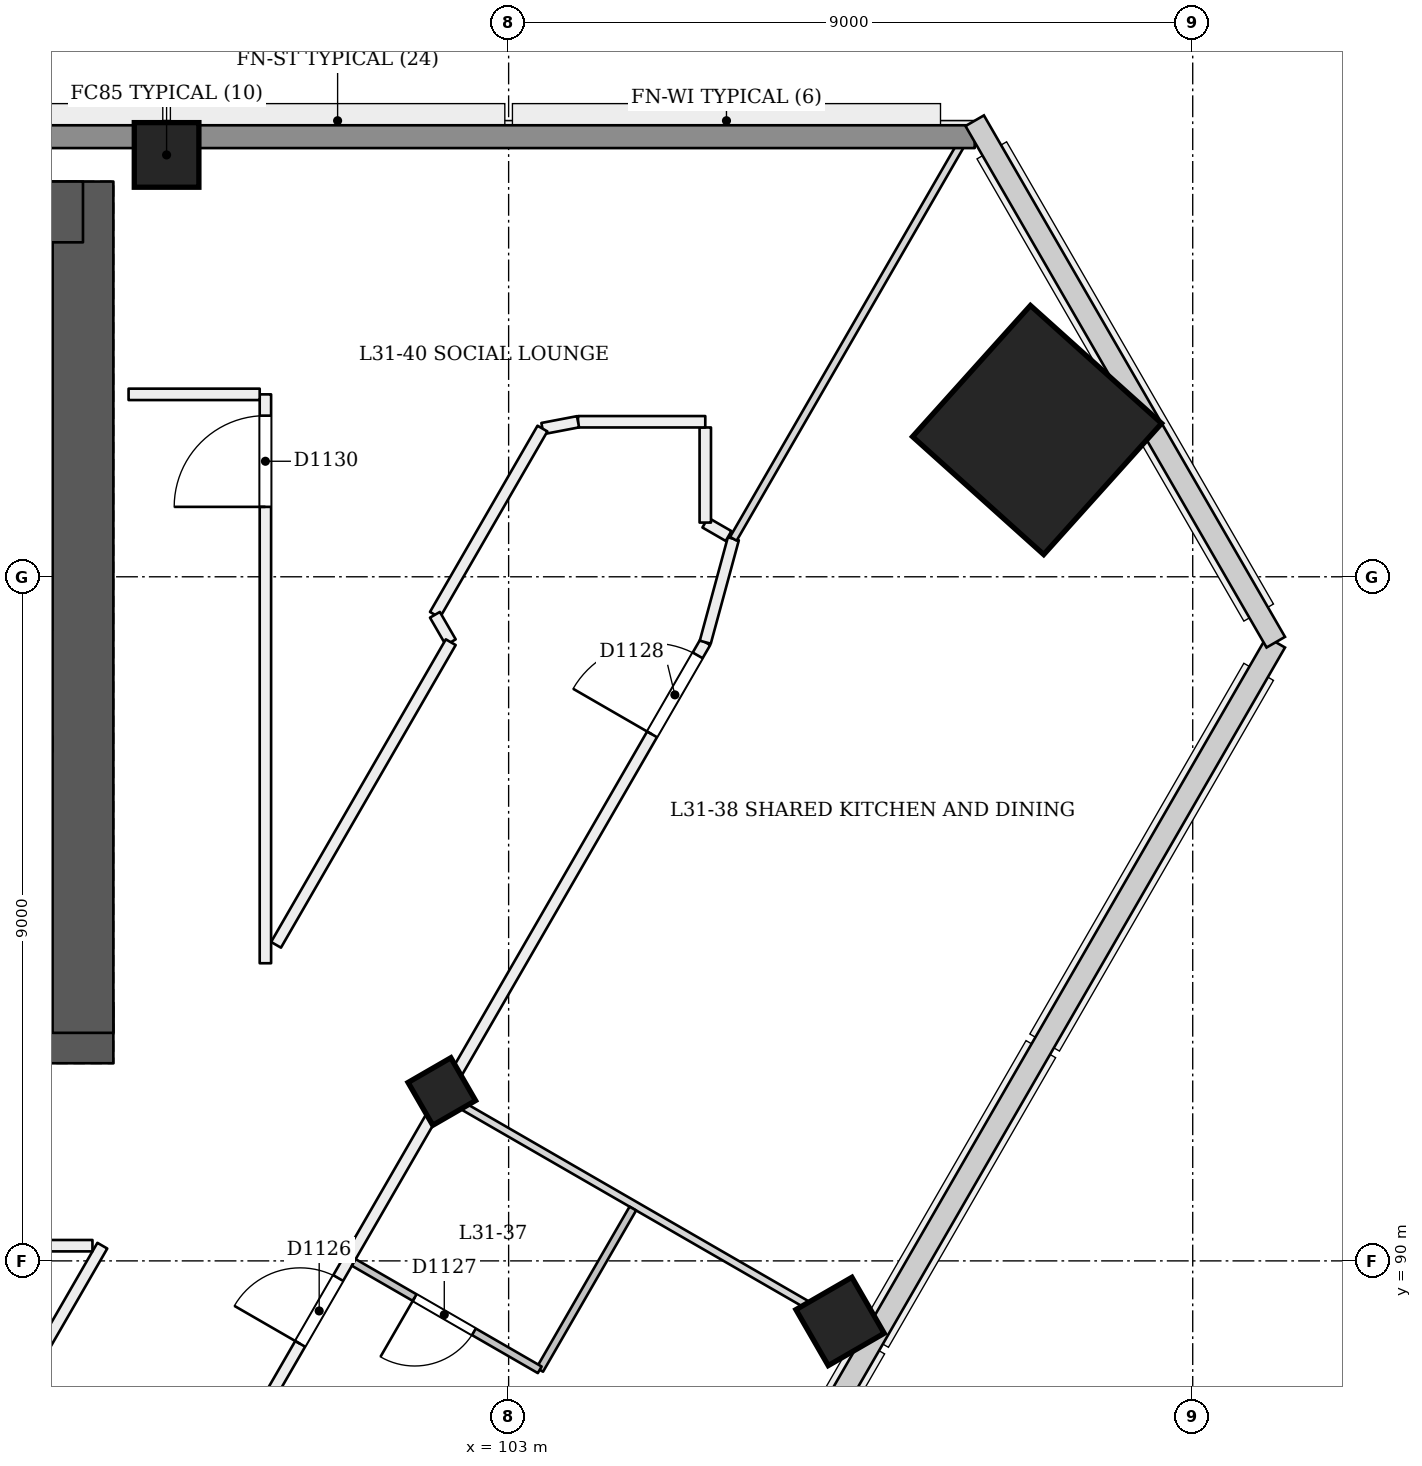
"""IFC4 building model, lengths in metres.
Left out: names, types, materials, properties, quantities, classifications, styles, units other than length and angle.
Written with IfcOpenShell. Run it as: python <this file> out.ifc"""

import sys

from ifc_helpers import new_model, si_unit, direction, frame, frame_2d, origin, origin_2d, place, context, subcontext, project, spatial, rectangle, extrude, element, fill, save


model = new_model("IFC4")
c1 = context("Model", 3, precision=1e-05, world=origin(), true_north=direction((0.0, 1.0)))
c2 = subcontext(c1, "Body", "Model", "MODEL_VIEW")
j1 = project(units=[si_unit("LENGTHUNIT", "METRE"), si_unit("PLANEANGLEUNIT", "RADIAN")], contexts=[c1])
p1 = place(None, origin())
s1 = spatial("IfcSite", under=j1, at=p1, CompositionType="ELEMENT")
p2 = place(p1, origin())
s2 = spatial("IfcBuilding", under=s1, at=p2, CompositionType="ELEMENT")
p3 = place(p2, frame((0.0, 0.0, 124.2)))
s3 = spatial("IfcBuildingStorey", under=s2, at=p3, CompositionType="ELEMENT", Elevation=124.2)
p4 = place(p3, frame((72.6, 93.0, 0.0), z_axis=(0.0, 0.0, 1.0), x_axis=(1.0, 0.0, 0.0)))
e1 = element("IfcWall", 1, at=p4, inside=s3, PredefinedType="SHEAR", context=c2, shape_type="SweptSolid", body=[
    extrude(rectangle(XDim=25.2, YDim=0.8, at=frame_2d((12.6, 0.0))), origin(), (0.0, 0.0, 1.0), 3.6),
])
p5 = place(p4, frame((1.2, 0.0, 0.0)))
e2 = element("IfcOpeningElement", 2, at=p5, cuts=e1, PredefinedType="OPENING", context=c2, shape_type="SweptSolid", body=[
    extrude(rectangle(XDim=1.2, YDim=2.1, at=frame_2d((0.6, 1.05))), frame((0.0, 0.411, 0.0), z_axis=(0.0, -1.0, 0.0), x_axis=(1.0, 0.0, 0.0)), (0.0, 0.0, 1.0), 0.821),
])
p6 = place(p4, frame((3.4, 0.0, 0.0)))
e3 = element("IfcOpeningElement", 3, at=p6, cuts=e1, PredefinedType="OPENING", context=c2, shape_type="SweptSolid", body=[
    extrude(rectangle(XDim=1.2, YDim=2.1, at=frame_2d((0.6, 1.05))), frame((0.0, 0.411, 0.0), z_axis=(0.0, -1.0, 0.0), x_axis=(1.0, 0.0, 0.0)), (0.0, 0.0, 1.0), 0.821),
])
p7 = place(p4, frame((13.4, 0.0, 0.0)))
e4 = element("IfcOpeningElement", 4, at=p7, cuts=e1, PredefinedType="OPENING", context=c2, shape_type="SweptSolid", body=[
    extrude(rectangle(XDim=1.2, YDim=2.1, at=frame_2d((0.6, 1.05))), frame((0.0, 0.411, 0.0), z_axis=(0.0, -1.0, 0.0), x_axis=(1.0, 0.0, 0.0)), (0.0, 0.0, 1.0), 0.821),
])
p8 = place(p4, frame((16.113, 0.0, 0.0)))
e5 = element("IfcOpeningElement", 5, at=p8, cuts=e1, PredefinedType="OPENING", context=c2, shape_type="SweptSolid", body=[
    extrude(rectangle(XDim=1.0, YDim=2.1, at=frame_2d((0.5, 1.05))), frame((0.0, 0.411, 0.0), z_axis=(0.0, -1.0, 0.0), x_axis=(1.0, 0.0, 0.0)), (0.0, 0.0, 1.0), 0.821),
])
p9 = place(p4, frame((20.0, 0.0, 0.0)))
e6 = element("IfcOpeningElement", 6, at=p9, cuts=e1, PredefinedType="OPENING", context=c2, shape_type="SweptSolid", body=[
    extrude(rectangle(XDim=1.0, YDim=2.1, at=frame_2d((0.5, 1.05))), frame((0.0, 0.411, 0.0), z_axis=(0.0, -1.0, 0.0), x_axis=(1.0, 0.0, 0.0)), (0.0, 0.0, 1.0), 0.821),
])
p10 = place(p4, frame((23.137, 0.0, 0.0)))
e7 = element("IfcOpeningElement", 7, at=p10, cuts=e1, PredefinedType="OPENING", context=c2, shape_type="SweptSolid", body=[
    extrude(rectangle(XDim=1.0, YDim=2.1, at=frame_2d((0.5, 1.05))), frame((0.0, 0.411, 0.0), z_axis=(0.0, -1.0, 0.0), x_axis=(1.0, 0.0, 0.0)), (0.0, 0.0, 1.0), 0.821),
])
p11 = place(p3, frame((97.4, 93.0, 0.0), z_axis=(0.0, 0.0, 1.0), x_axis=(0.0, 1.0, 0.0)))
e8 = element("IfcWall", 8, at=p11, inside=s3, PredefinedType="SHEAR", context=c2, shape_type="SweptSolid", body=[
    extrude(rectangle(XDim=11.2, YDim=0.8, at=frame_2d((5.6, 0.0))), origin(), (0.0, 0.0, 1.0), 3.6),
])
p12 = place(p3, frame((97.4, 103.8, 0.0), z_axis=(0.0, 0.0, 1.0), x_axis=(-1.0, 0.0, 0.0)))
e9 = element("IfcWall", 9, at=p12, inside=s3, PredefinedType="SHEAR", context=c2, shape_type="SweptSolid", body=[
    extrude(rectangle(XDim=25.2, YDim=0.8, at=frame_2d((12.6, 0.0))), origin(), (0.0, 0.0, 1.0), 3.6),
])
p13 = place(p3, frame((102.148, 92.181, -0.02), z_axis=(-0.022221406801, 0.038413224561, 0.999014831351), x_axis=(-0.499512940858, -0.866022219206, 0.022188685317)))
e10 = element("IfcColumn", 10, at=p13, inside=s3, PredefinedType="COLUMN", context=c2, shape_type="SweptSolid", body=[
    extrude(rectangle(XDim=0.65, YDim=0.65, at=origin_2d()), origin(), (0.0, 0.0, 1.0), 3.604),
])
p14 = place(p3, frame((109.986, 100.92, 0.0), z_axis=(-0.028334066552, 0.009286524205, 0.999555371723), x_axis=(0.498277960515, -0.866733668872, 0.022177044631)))
e11 = element("IfcColumn", 11, at=p14, inside=s3, PredefinedType="COLUMN", context=c2, shape_type="SweptSolid", body=[
    extrude(rectangle(XDim=2.32, YDim=2.32, at=origin_2d()), origin(), (0.0, 0.0, 1.0), 3.602),
])
p15 = place(p3, frame((98.5, 104.55, 0.0), z_axis=(0.0, 0.0, 1.0), x_axis=(1.0, 0.0, 0.0)))
e12 = element("IfcColumn", 12, at=p15, inside=s3, PredefinedType="COLUMN", context=c2, shape_type="SweptSolid", body=[
    extrude(rectangle(XDim=0.85, YDim=0.85, at=origin_2d()), origin(), (0.0, 0.0, 1.0), 3.6),
])
p16 = place(p3, frame((107.388, 89.156, -0.026), z_axis=(-0.022222852987, 0.038483477124, 0.999012095419), x_axis=(-0.500174626395, -0.865639439229, 0.022219459073)))
e13 = element("IfcColumn", 13, at=p16, inside=s3, PredefinedType="COLUMN", context=c2, shape_type="SweptSolid", body=[
    extrude(rectangle(XDim=0.85, YDim=0.85, at=origin_2d()), origin(), (0.0, 0.0, 1.0), 3.604),
])
p17 = place(p3, frame((97.655, 90.2, 0.0), z_axis=(0.0, 0.0, 1.0), x_axis=(-0.5000058613, -0.866022019735, 0.0)))
e14 = element("IfcWall", 14, at=p17, inside=s3, PredefinedType="PARTITIONING", context=c2, shape_type="SweptSolid", body=[
    extrude(rectangle(XDim=25.179, YDim=0.15, at=frame_2d((12.59, 0.0))), origin(), (0.0, 0.0, 1.0), 3.15),
])
p18 = place(p17, frame((11.939, 0.0, 0.0)))
e15 = element("IfcOpeningElement", 15, at=p18, cuts=e14, PredefinedType="OPENING", context=c2, shape_type="SweptSolid", body=[
    extrude(rectangle(XDim=1.0, YDim=2.1, at=frame_2d((0.5, 1.05))), frame((0.0, 0.085, 0.0), z_axis=(0.0, -1.0, 0.0), x_axis=(1.0, 0.0, 0.0)), (0.0, 0.0, 1.0), 0.171),
])
p19 = place(p17, frame((7.517, 0.0, 0.0)))
e16 = element("IfcOpeningElement", 16, at=p19, cuts=e14, PredefinedType="OPENING", context=c2, shape_type="SweptSolid", body=[
    extrude(rectangle(XDim=1.0, YDim=2.1, at=frame_2d((0.5, 1.05))), frame((0.0, 0.085, 0.0), z_axis=(0.0, -1.0, 0.0), x_axis=(1.0, 0.0, 0.0)), (0.0, 0.0, 1.0), 0.171),
])
p20 = place(p17, frame((3.271, 0.0, 0.0)))
e17 = element("IfcOpeningElement", 17, at=p20, cuts=e14, PredefinedType="OPENING", context=c2, shape_type="SweptSolid", body=[
    extrude(rectangle(XDim=1.0, YDim=2.1, at=frame_2d((0.5, 1.05))), frame((0.0, 0.085, 0.0), z_axis=(0.0, -1.0, 0.0), x_axis=(1.0, 0.0, 0.0)), (0.0, 0.0, 1.0), 0.171),
])
p21 = place(p17, frame((14.95, 0.0, 0.0)))
e18 = element("IfcOpeningElement", 18, at=p21, cuts=e14, PredefinedType="OPENING", context=c2, shape_type="SweptSolid", body=[
    extrude(rectangle(XDim=1.0, YDim=2.1, at=frame_2d((0.5, 1.05))), frame((0.0, 0.085, 0.0), z_axis=(0.0, -1.0, 0.0), x_axis=(1.0, 0.0, 0.0)), (0.0, 0.0, 1.0), 0.171),
])
p22 = place(p17, frame((18.033, 0.0, 0.0)))
e19 = element("IfcOpeningElement", 19, at=p22, cuts=e14, PredefinedType="OPENING", context=c2, shape_type="SweptSolid", body=[
    extrude(rectangle(XDim=1.0, YDim=2.1, at=frame_2d((0.5, 1.05))), frame((0.0, 0.085, 0.0), z_axis=(0.0, -1.0, 0.0), x_axis=(1.0, 0.0, 0.0)), (0.0, 0.0, 1.0), 0.171),
])
p23 = place(p3, frame((85.208, 62.842, 0.0), z_axis=(0.0, 0.0, 1.0), x_axis=(0.499999338616, 0.866025785634, 0.0)))
e20 = element("IfcWall", 20, at=p23, inside=s3, PredefinedType="PARTITIONING", context=c2, shape_type="SweptSolid", body=[
    extrude(rectangle(XDim=40.758, YDim=0.15, at=frame_2d((20.379, 0.0))), origin(), (0.0, 0.0, 1.0), 2.75),
])
p24 = place(p23, frame((0.295, 0.0, 0.0)))
e21 = element("IfcOpeningElement", 21, at=p24, cuts=e20, PredefinedType="OPENING", context=c2, shape_type="SweptSolid", body=[
    extrude(rectangle(XDim=1.2, YDim=2.1, at=frame_2d((0.6, 1.05))), frame((0.0, 0.085, 0.0), z_axis=(0.0, -1.0, 0.0), x_axis=(1.0, 0.0, 0.0)), (0.0, 0.0, 1.0), 0.171),
])
p25 = place(p23, frame((4.129, 0.0, 0.0)))
e22 = element("IfcOpeningElement", 22, at=p25, cuts=e20, PredefinedType="OPENING", context=c2, shape_type="SweptSolid", body=[
    extrude(rectangle(XDim=1.0, YDim=2.1, at=frame_2d((0.5, 1.05))), frame((0.0, 0.085, 0.0), z_axis=(0.0, -1.0, 0.0), x_axis=(1.0, 0.0, 0.0)), (0.0, 0.0, 1.0), 0.171),
])
p26 = place(p23, frame((9.659, 0.0, 0.0)))
e23 = element("IfcOpeningElement", 23, at=p26, cuts=e20, PredefinedType="OPENING", context=c2, shape_type="SweptSolid", body=[
    extrude(rectangle(XDim=1.0, YDim=2.1, at=frame_2d((0.5, 1.05))), frame((0.0, 0.085, 0.0), z_axis=(0.0, -1.0, 0.0), x_axis=(1.0, 0.0, 0.0)), (0.0, 0.0, 1.0), 0.171),
])
p27 = place(p23, frame((11.984, 0.0, 0.0)))
e24 = element("IfcOpeningElement", 24, at=p27, cuts=e20, PredefinedType="OPENING", context=c2, shape_type="SweptSolid", body=[
    extrude(rectangle(XDim=1.0, YDim=2.1, at=frame_2d((0.5, 1.05))), frame((0.0, 0.085, 0.0), z_axis=(0.0, -1.0, 0.0), x_axis=(1.0, 0.0, 0.0)), (0.0, 0.0, 1.0), 0.171),
])
p28 = place(p23, frame((18.774, 0.0, 0.0)))
e25 = element("IfcOpeningElement", 25, at=p28, cuts=e20, PredefinedType="OPENING", context=c2, shape_type="SweptSolid", body=[
    extrude(rectangle(XDim=1.0, YDim=2.1, at=frame_2d((0.5, 1.05))), frame((0.0, 0.085, 0.0), z_axis=(0.0, -1.0, 0.0), x_axis=(1.0, 0.0, 0.0)), (0.0, 0.0, 1.0), 0.171),
])
p29 = place(p23, frame((21.099, 0.0, 0.0)))
e26 = element("IfcOpeningElement", 26, at=p29, cuts=e20, PredefinedType="OPENING", context=c2, shape_type="SweptSolid", body=[
    extrude(rectangle(XDim=1.0, YDim=2.1, at=frame_2d((0.5, 1.05))), frame((0.0, 0.085, 0.0), z_axis=(0.0, -1.0, 0.0), x_axis=(1.0, 0.0, 0.0)), (0.0, 0.0, 1.0), 0.171),
])
p30 = place(p23, frame((27.659, 0.0, 0.0)))
e27 = element("IfcOpeningElement", 27, at=p30, cuts=e20, PredefinedType="OPENING", context=c2, shape_type="SweptSolid", body=[
    extrude(rectangle(XDim=1.0, YDim=2.1, at=frame_2d((0.5, 1.05))), frame((0.0, 0.085, 0.0), z_axis=(0.0, -1.0, 0.0), x_axis=(1.0, 0.0, 0.0)), (0.0, 0.0, 1.0), 0.171),
])
p31 = place(p23, frame((30.099, 0.0, 0.0)))
e28 = element("IfcOpeningElement", 28, at=p31, cuts=e20, PredefinedType="OPENING", context=c2, shape_type="SweptSolid", body=[
    extrude(rectangle(XDim=1.0, YDim=2.1, at=frame_2d((0.5, 1.05))), frame((0.0, 0.085, 0.0), z_axis=(0.0, -1.0, 0.0), x_axis=(1.0, 0.0, 0.0)), (0.0, 0.0, 1.0), 0.171),
])
p32 = place(p23, frame((39.358, 0.0, 0.0)))
e29 = element("IfcOpeningElement", 29, at=p32, cuts=e20, PredefinedType="OPENING", context=c2, shape_type="SweptSolid", body=[
    extrude(rectangle(XDim=1.2, YDim=2.1, at=frame_2d((0.6, 1.05))), frame((0.0, 0.085, 0.0), z_axis=(0.0, -1.0, 0.0), x_axis=(1.0, 0.0, 0.0)), (0.0, 0.0, 1.0), 0.171),
])
p33 = place(p3, frame((105.587, 98.139, 0.0), z_axis=(0.0, 0.0, 1.0), x_axis=(0.261842333215, 0.965110663363, 0.0)))
e30 = element("IfcWall", 30, at=p33, inside=s3, PredefinedType="PARTITIONING", context=c2, shape_type="SweptSolid", body=[
    extrude(rectangle(XDim=1.41, YDim=0.15, at=frame_2d((0.705, 0.0))), origin(), (0.0, 0.0, 1.0), 3.15),
])
p34 = place(p3, frame((105.894, 99.536, 0.0), z_axis=(0.0, 0.0, 1.0), x_axis=(-0.865898279276, 0.500220121494, 0.0)))
e31 = element("IfcWall", 31, at=p34, inside=s3, PredefinedType="PARTITIONING", context=c2, shape_type="SweptSolid", body=[
    extrude(rectangle(XDim=0.354, YDim=0.15, at=frame_2d((0.177, 0.0))), origin(), (0.0, 0.0, 1.0), 3.15),
])
p35 = place(p3, frame((105.587, 99.713, 0.0), z_axis=(0.0, 0.0, 1.0), x_axis=(0.0, 1.0, 0.0)))
e32 = element("IfcWall", 32, at=p35, inside=s3, PredefinedType="PARTITIONING", context=c2, shape_type="SweptSolid", body=[
    extrude(rectangle(XDim=1.251, YDim=0.15, at=frame_2d((0.626, 0.0))), origin(), (0.0, 0.0, 1.0), 3.15),
])
p36 = place(p3, frame((105.587, 101.04, 0.0), z_axis=(0.0, 0.0, 1.0), x_axis=(-1.0, 0.0, 0.0)))
e33 = element("IfcWall", 33, at=p36, inside=s3, PredefinedType="PARTITIONING", context=c2, shape_type="SweptSolid", body=[
    extrude(rectangle(XDim=1.674, YDim=0.15, at=frame_2d((0.837, 0.0))), origin(), (0.0, 0.0, 1.0), 3.15),
])
p37 = place(p3, frame((103.913, 101.04, 0.0), z_axis=(0.0, 0.0, 1.0), x_axis=(-0.982163245306, -0.188030209195, 0.0)))
e34 = element("IfcWall", 34, at=p37, inside=s3, PredefinedType="PARTITIONING", context=c2, shape_type="SweptSolid", body=[
    extrude(rectangle(XDim=0.477, YDim=0.15, at=frame_2d((0.238, 0.0))), origin(), (0.0, 0.0, 1.0), 3.15),
])
p38 = place(p3, frame((103.445, 100.95, 0.0), z_axis=(0.0, 0.0, 1.0), x_axis=(-0.499954046029, -0.866051933696, 0.0)))
e35 = element("IfcWall", 35, at=p38, inside=s3, PredefinedType="PARTITIONING", context=c2, shape_type="SweptSolid", body=[
    extrude(rectangle(XDim=2.829, YDim=0.15, at=frame_2d((1.415, 0.0))), origin(), (0.0, 0.0, 1.0), 3.15),
])
p39 = place(p3, frame((102.031, 98.5, 0.0), z_axis=(0.0, 0.0, 1.0), x_axis=(0.49967168172, -0.866214875471, 0.0)))
e36 = element("IfcWall", 36, at=p39, inside=s3, PredefinedType="PARTITIONING", context=c2, shape_type="SweptSolid", body=[
    extrude(rectangle(XDim=0.416, YDim=0.15, at=frame_2d((0.208, 0.0))), origin(), (0.0, 0.0, 1.0), 3.15),
])
p40 = place(p3, frame((102.239, 98.139, 0.0), z_axis=(0.0, 0.0, 1.0), x_axis=(-0.500005941123, -0.866021973648, 0.0)))
e37 = element("IfcWall", 37, at=p40, inside=s3, PredefinedType="PARTITIONING", context=c2, shape_type="SweptSolid", body=[
    extrude(rectangle(XDim=4.597, YDim=0.15, at=frame_2d((2.299, 0.0))), origin(), (0.0, 0.0, 1.0), 3.15),
])
p41 = place(p3, frame((99.8, 93.916, 0.0), z_axis=(0.0, 0.0, 1.0), x_axis=(0.0, 1.0, 0.0)))
e38 = element("IfcWall", 38, at=p41, inside=s3, PredefinedType="PARTITIONING", context=c2, shape_type="SweptSolid", body=[
    extrude(rectangle(XDim=7.484, YDim=0.15, at=frame_2d((3.742, 0.0))), origin(), (0.0, 0.0, 1.0), 3.15),
])
p42 = place(p41, frame((6.004, 0.0, 0.0)))
e39 = element("IfcOpeningElement", 39, at=p42, cuts=e38, PredefinedType="OPENING", context=c2, shape_type="SweptSolid", body=[
    extrude(rectangle(XDim=1.2, YDim=2.1, at=frame_2d((0.6, 1.05))), frame((0.0, 0.085, 0.0), z_axis=(0.0, -1.0, 0.0), x_axis=(1.0, 0.0, 0.0)), (0.0, 0.0, 1.0), 0.171),
])
p43 = place(p3, frame((99.725, 101.4, 0.0), z_axis=(0.0, 0.0, 1.0), x_axis=(-1.0, 0.0, 0.0)))
e40 = element("IfcWall", 40, at=p43, inside=s3, PredefinedType="PARTITIONING", context=c2, shape_type="SweptSolid", body=[
    extrude(rectangle(XDim=1.725, YDim=0.15, at=frame_2d((0.863, 0.0))), origin(), (0.0, 0.0, 1.0), 3.15),
])
p44 = place(p3, frame((88.0, 90.2, 0.0), z_axis=(0.0, 0.0, 1.0), x_axis=(1.0, 0.0, 0.0)))
e41 = element("IfcWall", 41, at=p44, inside=s3, PredefinedType="PARTITIONING", context=c2, shape_type="SweptSolid", body=[
    extrude(rectangle(XDim=9.525, YDim=0.15, at=frame_2d((4.762, 0.0))), origin(), (0.0, 0.0, 1.0), 3.15),
])
p45 = place(p3, frame((104.634, 90.689, 0.0), z_axis=(0.0, 0.0, 1.0), x_axis=(-0.499987006516, -0.866032905446, 0.0)))
e42 = element("IfcWall", 42, at=p45, inside=s3, PredefinedType="PARTITIONING", context=c2, shape_type="SweptSolid", body=[
    extrude(rectangle(XDim=2.45, YDim=0.1, at=frame_2d((1.225, 0.0))), origin(), (0.0, 0.0, 1.0), 2.75),
])
p46 = place(p3, frame((103.409, 88.567, 0.0), z_axis=(0.0, 0.0, 1.0), x_axis=(-0.866048868473, 0.499959355765, 0.0)))
e43 = element("IfcWall", 43, at=p46, inside=s3, PredefinedType="PARTITIONING", context=c2, shape_type="SweptSolid", body=[
    extrude(rectangle(XDim=2.825, YDim=0.1, at=frame_2d((1.413, 0.0))), origin(), (0.0, 0.0, 1.0), 3.15),
])
p47 = place(p46, frame((1.0, 0.0, 0.0)))
e44 = element("IfcOpeningElement", 44, at=p47, cuts=e43, PredefinedType="OPENING", context=c2, shape_type="SweptSolid", body=[
    extrude(rectangle(XDim=0.9, YDim=2.1, at=frame_2d((0.45, 1.05))), frame((0.0, 0.061, 0.0), z_axis=(0.0, -1.0, 0.0), x_axis=(1.0, 0.0, 0.0)), (0.0, 0.0, 1.0), 0.121),
])
p48 = place(p3, frame((107.69, 88.982, 0.0), z_axis=(0.0, 0.0, 1.0), x_axis=(-0.866032601554, 0.49998753289, 0.0)))
e45 = element("IfcWall", 45, at=p48, inside=s3, PredefinedType="PARTITIONING", context=c2, shape_type="SweptSolid", body=[
    extrude(rectangle(XDim=6.325, YDim=0.1, at=frame_2d((3.163, 0.0))), origin(), (0.0, 0.0, 1.0), 2.65),
])
p49 = place(p3, frame((109.074, 104.9, 0.0), z_axis=(0.0, 0.0, 1.0), x_axis=(-0.500004896655, -0.866022576681, 0.0)))
e46 = element("IfcWall", 46, at=p49, inside=s3, PredefinedType="PARTITIONING", context=c2, shape_type="SweptSolid", body=[
    extrude(rectangle(XDim=6.235, YDim=0.1, at=frame_2d((3.118, 0.0))), origin(), (0.0, 0.0, 1.0), 2.65),
])
p50 = place(p3, frame((60.868, 104.79, 0.0), z_axis=(0.0, 0.0, 1.0), x_axis=(1.0, 0.0, 0.0)))
e47 = element("IfcWall", 47, at=p50, inside=s3, PredefinedType="SOLIDWALL", context=c2, shape_type="SweptSolid", body=[
    extrude(rectangle(XDim=48.264, YDim=0.3, at=frame_2d((24.132, 0.0))), origin(), (0.0, 0.0, 1.0), 2.65),
])
p51 = place(p31, origin())
e48 = element("IfcDoor", 48, at=p51, inside=s3, OperationType="SINGLE_SWING_LEFT", PredefinedType="NOTDEFINED", context=c2, shape_type="SweptSolid", body=[
    extrude(rectangle(XDim=1.0, YDim=2.1, at=frame_2d((0.5, 1.05))), frame((0.0, 0.025, 0.0), z_axis=(0.0, -1.0, 0.0), x_axis=(1.0, 0.0, 0.0)), (0.0, 0.0, 1.0), 0.05),
])
fill(e28, e48)
p52 = place(p47, origin())
e49 = element("IfcDoor", 49, at=p52, inside=s3, OperationType="SINGLE_SWING_RIGHT", PredefinedType="NOTDEFINED", context=c2, shape_type="SweptSolid", body=[
    extrude(rectangle(XDim=0.9, YDim=2.1, at=frame_2d((0.45, 1.05))), frame((0.0, 0.025, 0.0), z_axis=(0.0, -1.0, 0.0), x_axis=(1.0, 0.0, 0.0)), (0.0, 0.0, 1.0), 0.05),
])
fill(e44, e49)
p53 = place(p32, origin())
e50 = element("IfcDoor", 50, at=p53, inside=s3, OperationType="SINGLE_SWING_LEFT", PredefinedType="NOTDEFINED", context=c2, shape_type="SweptSolid", body=[
    extrude(rectangle(XDim=1.2, YDim=2.1, at=frame_2d((0.6, 1.05))), frame((0.0, 0.025, 0.0), z_axis=(0.0, -1.0, 0.0), x_axis=(1.0, 0.0, 0.0)), (0.0, 0.0, 1.0), 0.05),
])
fill(e29, e50)
p54 = place(p42, origin())
e51 = element("IfcDoor", 51, at=p54, inside=s3, OperationType="SINGLE_SWING_LEFT", PredefinedType="NOTDEFINED", context=c2, shape_type="SweptSolid", body=[
    extrude(rectangle(XDim=1.2, YDim=2.1, at=frame_2d((0.6, 1.05))), frame((0.0, 0.025, 0.0), z_axis=(0.0, -1.0, 0.0), x_axis=(1.0, 0.0, 0.0)), (0.0, 0.0, 1.0), 0.05),
])
fill(e39, e51)
save(model, sys.argv[1])
